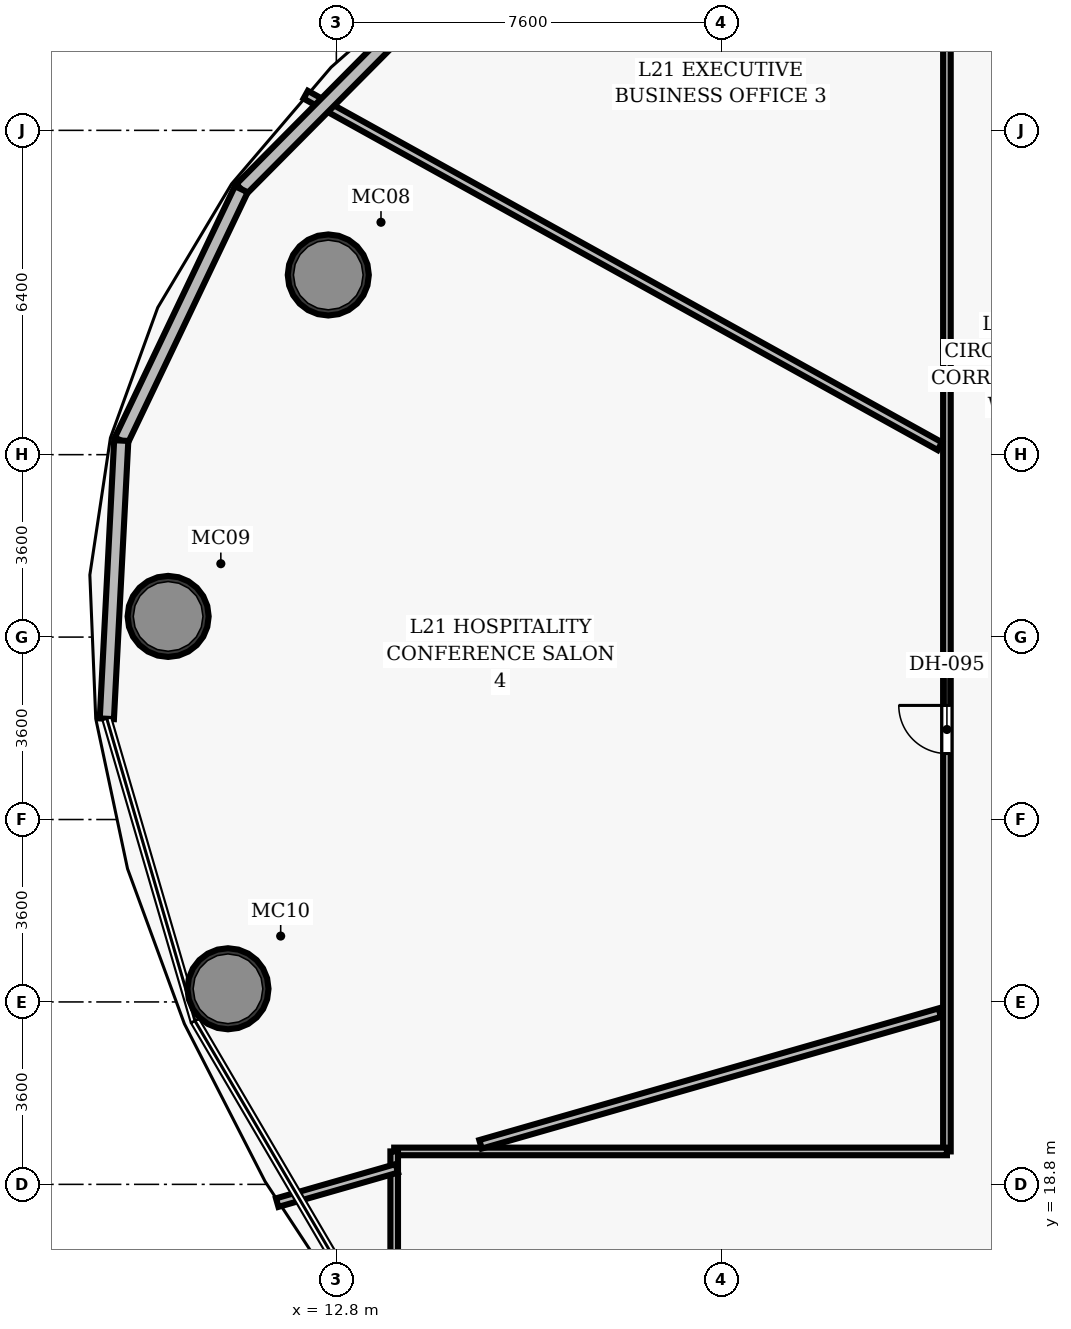
"""IFC4 building model, lengths in metres.
Left out: names, types, materials, properties, quantities, classifications, styles, units other than length and angle.
Written with IfcOpenShell. Run it as: python <this file> out.ifc"""

import sys

from ifc_helpers import new_model, si_unit, direction, frame, frame_2d, origin, origin_2d, place, context, subcontext, project, spatial, rectangle, hollow_circle, extrude, element, fill, save


model = new_model("IFC4")
c1 = context("Model", 3, precision=1e-05, world=origin(), true_north=direction((0.0, 1.0)))
c2 = subcontext(c1, "Body", "Model", "MODEL_VIEW")
j1 = project(units=[si_unit("LENGTHUNIT", "METRE"), si_unit("PLANEANGLEUNIT", "RADIAN")], contexts=[c1])
p1 = place(None, origin())
s1 = spatial("IfcSite", under=j1, at=p1, CompositionType="ELEMENT")
p2 = place(p1, origin())
s2 = spatial("IfcBuilding", under=s1, at=p2, CompositionType="ELEMENT")
p3 = place(p2, frame((0.0, 0.0, 90.4)))
s3 = spatial("IfcBuildingStorey", under=s2, at=p3, CompositionType="ELEMENT", Elevation=90.4)
for number, where, z_axis, x_axis in (
    (1, (12.641, 36.746, 0.0), (0.0, 0.0, 1.0), (1.0, 0.0, 0.0)),
    (2, (9.48, 30.008, 0.0), (0.0, 0.0, 1.0), (1.0, 0.0, 0.0)),
    (3, (10.661, 22.66, 0.0), (0.0, 0.0, 1.0), (1.0, 0.0, 0.0)),
):
    element("IfcColumn", number, at=place(p3, frame(where, z_axis=z_axis, x_axis=x_axis)), inside=s3, PredefinedType="COLUMN", context=c2, shape_type="SweptSolid", body=[
        extrude(hollow_circle(Radius=0.8, WallThickness=0.06, at=origin_2d()), origin(), (0.0, 0.0, 1.0), 3.5),
    ])
p4 = place(p3, frame((24.85, 19.45, 0.0), z_axis=(0.0, 0.0, 1.0), x_axis=(0.0, 1.0, 0.0)))
e4 = element("IfcWall", 4, at=p4, inside=s3, PredefinedType="PARTITIONING", context=c2, shape_type="SweptSolid", body=[
    extrude(rectangle(XDim=15.9, YDim=0.15, at=frame_2d((7.95, 0.0))), origin(), (0.0, 0.0, 1.0), 2.6),
])
p5 = place(p4, frame((7.852, 0.0, 0.0)))
e5 = element("IfcOpeningElement", 5, at=p5, cuts=e4, PredefinedType="OPENING", context=c2, shape_type="SweptSolid", body=[
    extrude(rectangle(XDim=0.95, YDim=2.15, at=frame_2d((0.475, 1.075))), frame((0.0, 0.085, 0.0), z_axis=(0.0, -1.0, 0.0), x_axis=(1.0, 0.0, 0.0)), (0.0, 0.0, 1.0), 0.17),
])
p6 = place(p3, frame((13.942, 19.45, 0.0), z_axis=(0.0, 0.0, 1.0), x_axis=(1.0, 0.0, 0.0)))
e6 = element("IfcWall", 6, at=p6, inside=s3, PredefinedType="PARTITIONING", context=c2, shape_type="SweptSolid", body=[
    extrude(rectangle(XDim=10.908, YDim=0.15, at=frame_2d((5.454, 0.0))), origin(), (0.0, 0.0, 1.0), 2.6),
])
p7 = place(p3, frame((13.942, 16.65, 0.0), z_axis=(0.0, 0.0, 1.0), x_axis=(0.0, 1.0, 0.0)))
e7 = element("IfcWall", 7, at=p7, inside=s3, PredefinedType="PARTITIONING", context=c2, shape_type="SweptSolid", body=[
    extrude(rectangle(XDim=2.8, YDim=0.15, at=frame_2d((1.4, 0.0))), origin(), (0.0, 0.0, 1.0), 2.6),
])
p8 = place(p3, frame((24.85, 35.35, 0.0), z_axis=(0.0, 0.0, 1.0), x_axis=(0.0, 1.0, 0.0)))
e8 = element("IfcWall", 8, at=p8, inside=s3, PredefinedType="PARTITIONING", context=c2, shape_type="SweptSolid", body=[
    extrude(rectangle(XDim=10.15, YDim=0.15, at=frame_2d((5.075, 0.0))), origin(), (0.0, 0.0, 1.0), 2.6),
])
p9 = place(p3, frame((24.71, 33.367, 0.0), z_axis=(0.0, 0.0, 1.0), x_axis=(-0.874610832143, 0.484825630819, 0.0)))
e9 = element("IfcWall", 9, at=p9, inside=s3, PredefinedType="PARTITIONING", context=c2, shape_type="SweptSolid", body=[
    extrude(rectangle(XDim=14.308, YDim=0.175, at=frame_2d((7.154, 0.0))), origin(), (0.0, 0.0, 1.0), 2.6),
])
p10 = place(p3, frame((24.71, 22.189, 0.0), z_axis=(0.0, 0.0, 1.0), x_axis=(-0.961261668066, -0.275637453019, 0.0)))
e10 = element("IfcWall", 10, at=p10, inside=s3, PredefinedType="PARTITIONING", context=c2, shape_type="SweptSolid", body=[
    extrude(rectangle(XDim=9.429, YDim=0.175, at=frame_2d((4.715, 0.0))), origin(), (0.0, 0.0, 1.0), 2.6),
])
p11 = place(p3, frame((13.994, 19.116, 0.0), z_axis=(0.0, 0.0, 1.0), x_axis=(-0.961257162415, -0.275653165602, 0.0)))
e11 = element("IfcWall", 11, at=p11, inside=s3, PredefinedType="PARTITIONING", context=c2, shape_type="SweptSolid", body=[
    extrude(rectangle(XDim=2.456, YDim=0.175, at=frame_2d((1.228, 0.0))), origin(), (0.0, 0.0, 1.0), 2.6),
])
p12 = place(p3, frame((10.925, 38.438, 0.0), z_axis=(0.0, 0.0, 1.0), x_axis=(0.704291107344, 0.709911287497, 0.0)))
e12 = element("IfcWall", 12, at=p12, inside=s3, PredefinedType="SOLIDWALL", context=c2, shape_type="SweptSolid", body=[
    extrude(rectangle(XDim=6.212, YDim=0.28, at=frame_2d((3.106, 0.0))), origin(), (0.0, 0.0, 1.0), 3.25),
])
p13 = place(p3, frame((8.555, 33.478, 0.0), z_axis=(0.0, 0.0, 1.0), x_axis=(0.431119191354, 0.902294986602, 0.0)))
e13 = element("IfcWall", 13, at=p13, inside=s3, PredefinedType="SOLIDWALL", context=c2, shape_type="SweptSolid", body=[
    extrude(rectangle(XDim=5.498, YDim=0.28, at=frame_2d((2.749, 0.0))), origin(), (0.0, 0.0, 1.0), 3.25),
])
p14 = place(p3, frame((8.271, 27.988, 0.0), z_axis=(0.0, 0.0, 1.0), x_axis=(0.051649739807, 0.998665261425, 0.0)))
e14 = element("IfcWall", 14, at=p14, inside=s3, PredefinedType="SOLIDWALL", context=c2, shape_type="SweptSolid", body=[
    extrude(rectangle(XDim=5.497, YDim=0.28, at=frame_2d((2.749, 0.0))), origin(), (0.0, 0.0, 1.0), 3.25),
])
p15 = place(p5, origin())
e15 = element("IfcDoor", 15, at=p15, inside=s3, OperationType="SINGLE_SWING_RIGHT", PredefinedType="DOOR", context=c2, shape_type="SweptSolid", body=[
    extrude(rectangle(XDim=0.95, YDim=2.15, at=frame_2d((0.475, 1.075))), frame((0.0, 0.025, 0.0), z_axis=(0.0, -1.0, 0.0), x_axis=(1.0, 0.0, 0.0)), (0.0, 0.0, 1.0), 0.05),
])
fill(e5, e15)
save(model, sys.argv[1])
